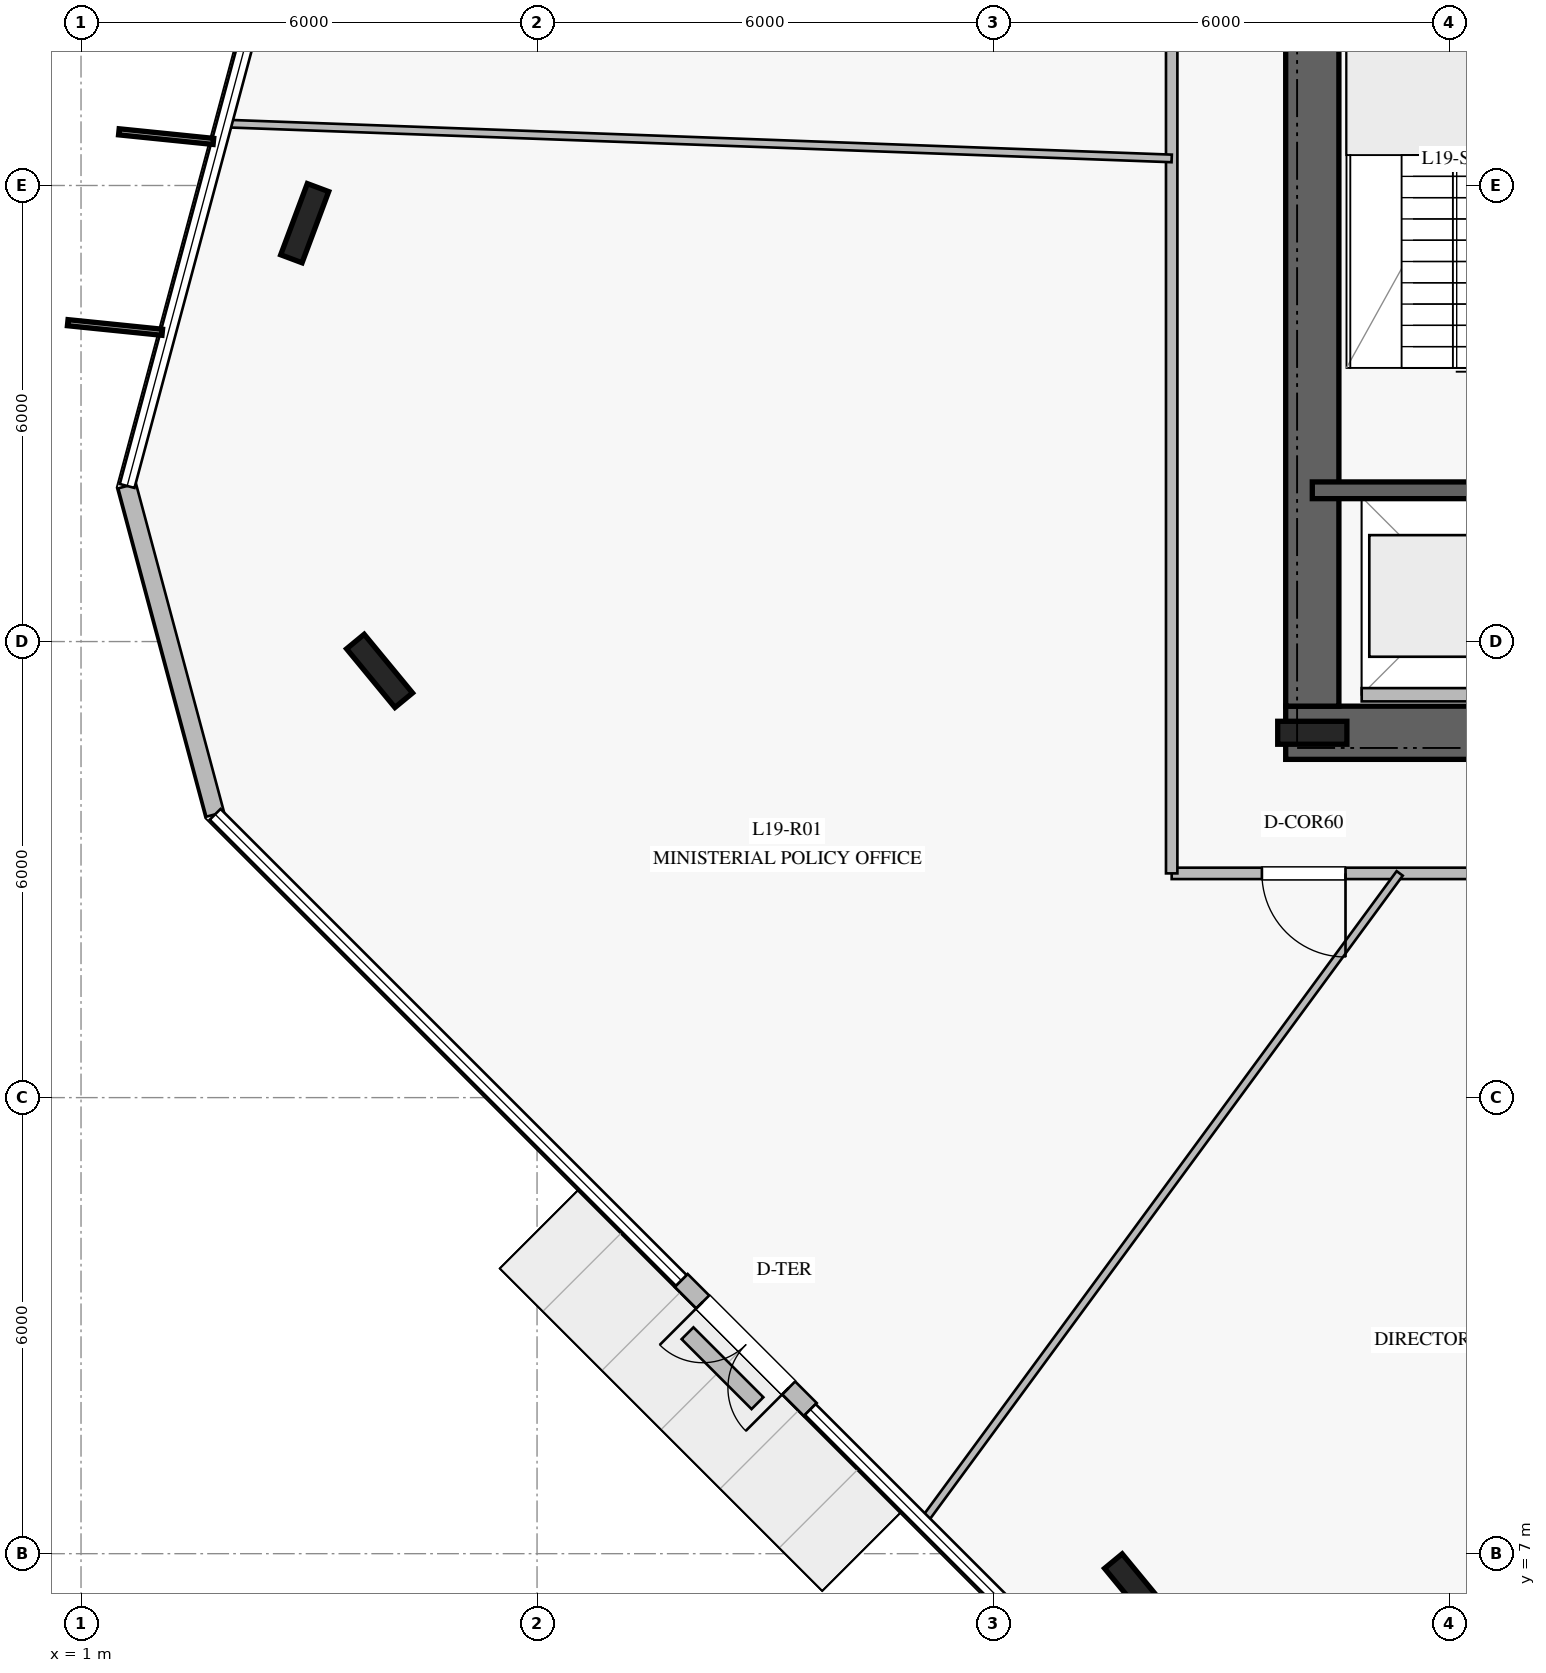
"""IFC4 building model, lengths in metres.
Left out: names, types, materials, properties, quantities, classifications, styles, units other than length and angle.
Written with IfcOpenShell. Run it as: python <this file> out.ifc"""

import sys

from ifc_helpers import new_model, si_unit, direction, frame, frame_2d, origin, origin_2d, place, context, subcontext, project, spatial, rectangle, i_section, extrude, element, fill, save


model = new_model("IFC4")
c1 = context("Model", 3, precision=1e-05, world=origin(), true_north=direction((0.0, 1.0)))
c2 = subcontext(c1, "Body", "Model", "MODEL_VIEW")
j1 = project(units=[si_unit("LENGTHUNIT", "METRE"), si_unit("PLANEANGLEUNIT", "RADIAN")], contexts=[c1])
p1 = place(None, origin())
s1 = spatial("IfcSite", under=j1, at=p1, CompositionType="ELEMENT")
p2 = place(p1, origin())
s2 = spatial("IfcBuilding", under=s1, at=p2, CompositionType="ELEMENT")
p3 = place(p2, frame((0.0, 0.0, 80.0)))
s3 = spatial("IfcBuildingStorey", under=s2, at=p3, CompositionType="ELEMENT", Elevation=80.0)
p4 = place(p3, frame((16.85, 17.8, 0.0), z_axis=(0.0, 0.0, 1.0), x_axis=(1.0, 0.0, 0.0)))
e1 = element("IfcWall", 1, at=p4, inside=s3, PredefinedType="SHEAR", context=c2, shape_type="SweptSolid", body=[
    extrude(rectangle(XDim=16.3, YDim=0.7, at=frame_2d((8.15, 0.0))), origin(), (0.0, 0.0, 1.0), 3.76),
])
p5 = place(p4, frame((5.1, 0.0, 0.0)))
e2 = element("IfcOpeningElement", 2, at=p5, cuts=e1, PredefinedType="OPENING", context=c2, shape_type="SweptSolid", body=[
    extrude(rectangle(XDim=1.2, YDim=2.25, at=frame_2d((0.6, 1.125))), frame((0.0, 0.36, 0.0), z_axis=(0.0, -1.0, 0.0), x_axis=(1.0, 0.0, 0.0)), (0.0, 0.0, 1.0), 0.72),
])
p6 = place(p4, frame((14.05, 0.0, 0.0)))
e3 = element("IfcOpeningElement", 3, at=p6, cuts=e1, PredefinedType="OPENING", context=c2, shape_type="SweptSolid", body=[
    extrude(rectangle(XDim=0.9, YDim=2.1, at=frame_2d((0.45, 1.05))), frame((0.0, 0.36, 0.0), z_axis=(0.0, -1.0, 0.0), x_axis=(1.0, 0.0, 0.0)), (0.0, 0.0, 1.0), 0.72),
])
p7 = place(p4, frame((7.95, 0.0, 0.0)))
e4 = element("IfcOpeningElement", 4, at=p7, cuts=e1, PredefinedType="OPENING", context=c2, shape_type="SweptSolid", body=[
    extrude(rectangle(XDim=1.1, YDim=2.2, at=frame_2d((0.55, 1.1))), frame((0.0, 0.36, 0.0), z_axis=(0.0, -1.0, 0.0), x_axis=(1.0, 0.0, 0.0)), (0.0, 0.0, 1.0), 0.72),
])
p8 = place(p4, frame((9.925, 0.0, 0.0)))
e5 = element("IfcOpeningElement", 5, at=p8, cuts=e1, PredefinedType="OPENING", context=c2, shape_type="SweptSolid", body=[
    extrude(rectangle(XDim=1.1, YDim=2.2, at=frame_2d((0.55, 1.1))), frame((0.0, 0.36, 0.0), z_axis=(0.0, -1.0, 0.0), x_axis=(1.0, 0.0, 0.0)), (0.0, 0.0, 1.0), 0.72),
])
p9 = place(p4, frame((11.9, 0.0, 0.0)))
e6 = element("IfcOpeningElement", 6, at=p9, cuts=e1, PredefinedType="OPENING", context=c2, shape_type="SweptSolid", body=[
    extrude(rectangle(XDim=1.1, YDim=2.2, at=frame_2d((0.55, 1.1))), frame((0.0, 0.36, 0.0), z_axis=(0.0, -1.0, 0.0), x_axis=(1.0, 0.0, 0.0)), (0.0, 0.0, 1.0), 0.72),
])
p10 = place(p3, frame((17.2, 31.85, 0.0), z_axis=(0.0, 0.0, 1.0), x_axis=(0.0, -1.0, 0.0)))
e7 = element("IfcWall", 7, at=p10, inside=s3, PredefinedType="SHEAR", context=c2, shape_type="SweptSolid", body=[
    extrude(rectangle(XDim=13.7, YDim=0.7, at=frame_2d((6.85, 0.0))), origin(), (0.0, 0.0, 1.0), 3.76),
])
p11 = place(p10, frame((2.0, 0.0, 0.0)))
e8 = element("IfcOpeningElement", 8, at=p11, cuts=e7, PredefinedType="OPENING", context=c2, shape_type="SweptSolid", body=[
    extrude(rectangle(XDim=1.5, YDim=2.2, at=frame_2d((0.75, 1.1))), frame((0.0, 0.36, 0.0), z_axis=(0.0, -1.0, 0.0), x_axis=(1.0, 0.0, 0.0)), (0.0, 0.0, 1.0), 0.72),
])
p12 = place(p3, frame((17.2, 17.8, 0.0), z_axis=(0.0, 0.0, 1.0), x_axis=(1.0, 0.0, 0.0)))
e9 = element("IfcColumn", 9, at=p12, inside=s3, PredefinedType="COLUMN", context=c2, shape_type="SweptSolid", body=[
    extrude(i_section(OverallWidth=0.302, OverallDepth=0.91, WebThickness=0.021, FlangeThickness=0.04, at=origin_2d()), origin(), (0.0, 0.0, 1.0), 4.0),
])
p13 = place(p3, frame((17.2, 20.99, 0.0), z_axis=(0.0, 0.0, 1.0), x_axis=(1.0, 0.0, 0.0)))
e10 = element("IfcWall", 10, at=p13, inside=s3, PredefinedType="SOLIDWALL", context=c2, shape_type="SweptSolid", body=[
    extrude(rectangle(XDim=3.72, YDim=0.22, at=frame_2d((1.86, 0.0))), origin(), (0.0, 0.0, 1.0), 3.76),
])
for number, where, z_axis, x_axis in (
    (11, (3.943, 24.504, 0.0), (0.0, 0.0, 1.0), (0.35, 0.937, 0.0)),
    (12, (4.928, 18.614, 0.0), (0.0, 0.0, 1.0), (-0.636, 0.772, 0.0)),
    (13, (14.901, 6.516, 0.0), (0.0, 0.0, 1.0), (-0.636, 0.772, 0.0)),
):
    element("IfcColumn", number, at=place(p3, frame(where, z_axis=z_axis, x_axis=x_axis)), inside=s3, PredefinedType="COLUMN", context=c2, shape_type="SweptSolid", body=[
        extrude(i_section(OverallWidth=0.3, OverallDepth=1.0, WebThickness=0.019, FlangeThickness=0.036, at=origin_2d()), origin(), (0.0, 0.0, 1.0), 4.0),
    ])
p14 = place(p3, frame((1.607, 21.047, 0.0), z_axis=(0.0, 0.0, 1.0), x_axis=(0.258902519869, -0.965903455427, 0.0)))
e14 = element("IfcWall", 14, at=p14, inside=s3, PredefinedType="STANDARD", context=c2, shape_type="SweptSolid", body=[
    extrude(rectangle(XDim=4.473, YDim=0.24, at=frame_2d((2.236, 0.0))), origin(), (0.0, 0.0, 1.0), 3.76),
])
p15 = place(p3, frame((8.897, 10.595, 0.0), z_axis=(0.0, 0.0, 1.0), x_axis=(0.707106781187, -0.707106781187, 0.0)))
e15 = element("IfcWall", 15, at=p15, inside=s3, PredefinedType="STANDARD", context=c2, shape_type="SweptSolid", body=[
    extrude(rectangle(XDim=2.401, YDim=0.24, at=frame_2d((1.201, 0.0))), origin(), (0.0, 0.0, 1.0), 3.76),
])
p16 = place(p15, frame((0.4, 0.0, 0.0)))
e16 = element("IfcOpeningElement", 16, at=p16, cuts=e15, PredefinedType="OPENING", context=c2, shape_type="SweptSolid", body=[
    extrude(rectangle(XDim=1.6, YDim=2.25, at=frame_2d((0.8, 1.125))), frame((0.0, 0.13, 0.0), z_axis=(0.0, -1.0, 0.0), x_axis=(1.0, 0.0, 0.0)), (0.0, 0.0, 1.0), 0.26),
])
p17 = place(p3, frame((8.98, 9.9, 0.0), z_axis=(0.0, 0.0, 1.0), x_axis=(0.707106781187, -0.707106781187, 0.0)))
e17 = element("IfcWall", 17, at=p17, inside=s3, PredefinedType="USERDEFINED", context=c2, shape_type="SweptSolid", body=[
    extrude(rectangle(XDim=1.301, YDim=0.22, at=frame_2d((0.65, 0.0))), origin(), (0.0, 0.0, 1.0), 0.4),
])
p18 = place(p3, frame((17.85, 18.3, 0.0), z_axis=(0.0, 0.0, 1.0), x_axis=(1.0, 0.0, 0.0)))
e18 = element("IfcWall", 18, at=p18, inside=s3, PredefinedType="PARTITIONING", context=c2, shape_type="SweptSolid", body=[
    extrude(rectangle(XDim=2.6, YDim=0.175, at=frame_2d((1.3, 0.0))), origin(), (0.0, 0.0, 1.0), 3.76),
])
p19 = place(p3, frame((34.65, 15.95, 0.0), z_axis=(0.0, 0.0, 1.0), x_axis=(-1.0, 0.0, 0.0)))
e19 = element("IfcWall", 19, at=p19, inside=s3, PredefinedType="PARTITIONING", context=c2, shape_type="SweptSolid", body=[
    extrude(rectangle(XDim=19.3, YDim=0.15, at=frame_2d((9.65, 0.0))), origin(), (0.0, 0.0, 1.0), 3.21),
])
p20 = place(p19, frame((17.013, 0.0, 0.0)))
e20 = element("IfcOpeningElement", 20, at=p20, cuts=e19, PredefinedType="OPENING", context=c2, shape_type="SweptSolid", body=[
    extrude(rectangle(XDim=1.1, YDim=2.2, at=frame_2d((0.55, 1.1))), frame((0.0, 0.085, 0.0), z_axis=(0.0, -1.0, 0.0), x_axis=(1.0, 0.0, 0.0)), (0.0, 0.0, 1.0), 0.17),
])
p21 = place(p19, frame((11.951, 0.0, 0.0)))
e21 = element("IfcOpeningElement", 21, at=p21, cuts=e19, PredefinedType="OPENING", context=c2, shape_type="SweptSolid", body=[
    extrude(rectangle(XDim=1.1, YDim=2.2, at=frame_2d((0.55, 1.1))), frame((0.0, 0.085, 0.0), z_axis=(0.0, -1.0, 0.0), x_axis=(1.0, 0.0, 0.0)), (0.0, 0.0, 1.0), 0.17),
])
p22 = place(p3, frame((15.35, 15.95, 0.0), z_axis=(0.0, 0.0, 1.0), x_axis=(0.0, 1.0, 0.0)))
e22 = element("IfcWall", 22, at=p22, inside=s3, PredefinedType="PARTITIONING", context=c2, shape_type="SweptSolid", body=[
    extrude(rectangle(XDim=18.1, YDim=0.15, at=frame_2d((9.05, 0.0))), origin(), (0.0, 0.0, 1.0), 3.21),
])
p23 = place(p22, frame((12.932, 0.0, 0.0)))
e23 = element("IfcOpeningElement", 23, at=p23, cuts=e22, PredefinedType="OPENING", context=c2, shape_type="SweptSolid", body=[
    extrude(rectangle(XDim=1.1, YDim=2.2, at=frame_2d((0.55, 1.1))), frame((0.0, 0.085, 0.0), z_axis=(0.0, -1.0, 0.0), x_axis=(1.0, 0.0, 0.0)), (0.0, 0.0, 1.0), 0.17),
])
p24 = place(p3, frame((15.35, 25.356, 0.0), z_axis=(0.0, 0.0, 1.0), x_axis=(-0.99932080841, 0.036849991562, 0.0)))
e24 = element("IfcWall", 24, at=p24, inside=s3, PredefinedType="MOVABLE", context=c2, shape_type="SweptSolid", body=[
    extrude(rectangle(XDim=12.456, YDim=0.1, at=frame_2d((6.228, 0.0))), origin(), (0.0, 0.0, 1.0), 3.02),
])
p25 = place(p3, frame((18.35, 15.95, 0.0), z_axis=(0.0, 0.0, 1.0), x_axis=(-0.592192095979, -0.805796823932, 0.0)))
e25 = element("IfcWall", 25, at=p25, inside=s3, PredefinedType="MOVABLE", context=c2, shape_type="SweptSolid", body=[
    extrude(rectangle(XDim=10.575, YDim=0.1, at=frame_2d((5.287, 0.0))), origin(), (0.0, 0.0, 1.0), 3.05),
])
p26 = place(p16, frame((1.6, 0.0, 0.0), z_axis=(0.0, 0.0, 1.0), x_axis=(-1.0, 0.0, 0.0)))
e26 = element("IfcDoor", 26, at=p26, inside=s3, OperationType="DOUBLE_DOOR_SINGLE_SWING", PredefinedType="DOOR", context=c2, shape_type="SweptSolid", body=[
    extrude(rectangle(XDim=1.6, YDim=2.25, at=frame_2d((0.8, 1.125))), frame((0.0, 0.025, 0.0), z_axis=(0.0, -1.0, 0.0), x_axis=(1.0, 0.0, 0.0)), (0.0, 0.0, 1.0), 0.05),
])
fill(e16, e26)
p27 = place(p20, origin())
e27 = element("IfcDoor", 27, at=p27, inside=s3, OperationType="SINGLE_SWING_LEFT", PredefinedType="DOOR", context=c2, shape_type="SweptSolid", body=[
    extrude(rectangle(XDim=1.1, YDim=2.2, at=frame_2d((0.55, 1.1))), frame((0.0, 0.025, 0.0), z_axis=(0.0, -1.0, 0.0), x_axis=(1.0, 0.0, 0.0)), (0.0, 0.0, 1.0), 0.05),
])
fill(e20, e27)
save(model, sys.argv[1])
